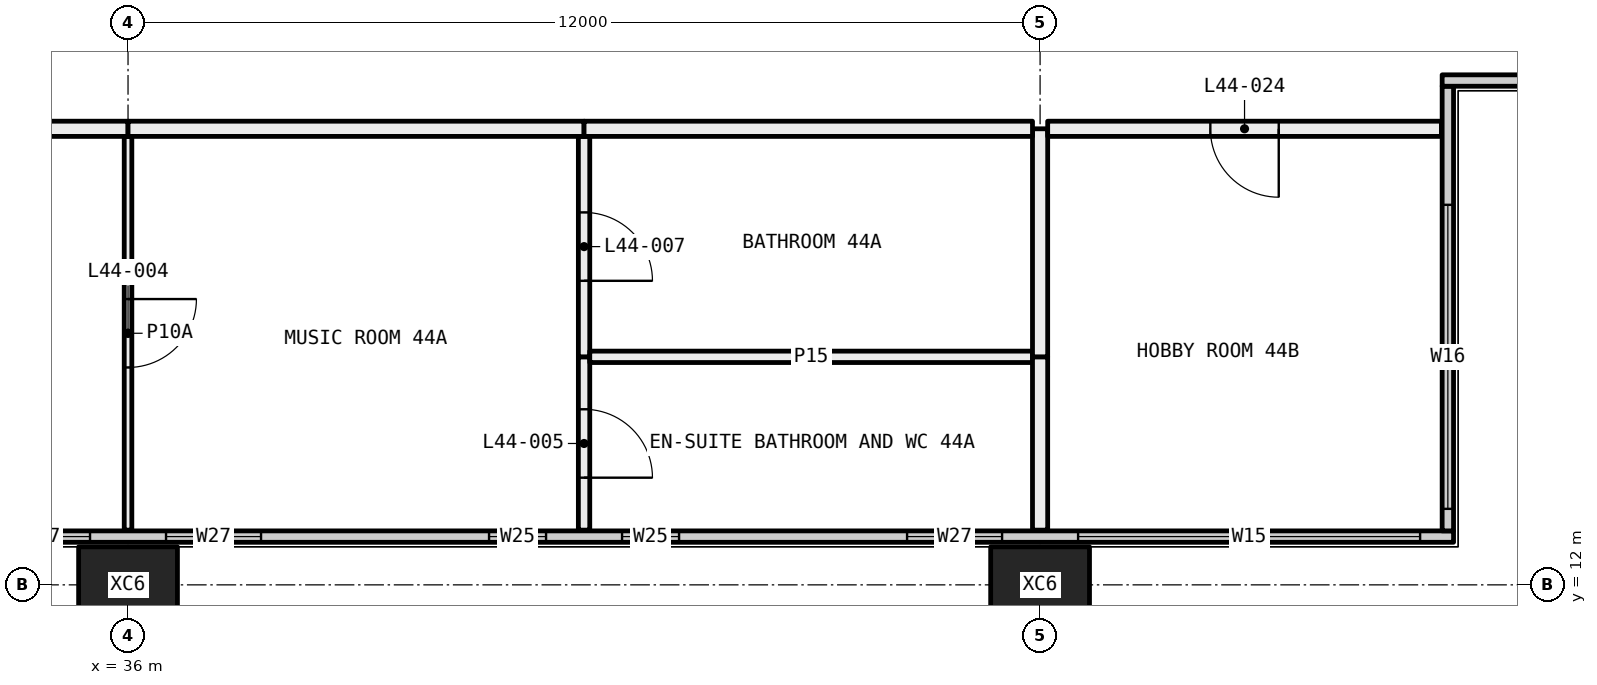
"""IFC4 building model, lengths in metres.
Left out: names, types, materials, properties, quantities, classifications, styles, units other than length and angle.
Written with IfcOpenShell. Run it as: python <this file> out.ifc"""

import sys

from ifc_helpers import new_model, si_unit, direction, frame, frame_2d, origin, origin_2d, place, context, subcontext, project, spatial, rectangle, hollow_rectangle, extrude, element, fill, save


model = new_model("IFC4")
c1 = context("Model", 3, precision=1e-05, world=origin(), true_north=direction((0.0, 1.0)))
c2 = subcontext(c1, "Body", "Model", "MODEL_VIEW")
j1 = project(units=[si_unit("LENGTHUNIT", "METRE"), si_unit("PLANEANGLEUNIT", "RADIAN")], contexts=[c1])
p1 = place(None, origin())
s1 = spatial("IfcSite", under=j1, at=p1, CompositionType="ELEMENT")
p2 = place(p1, origin())
s2 = spatial("IfcBuilding", under=s1, at=p2, CompositionType="ELEMENT")
p3 = place(p2, frame((0.0, 0.0, 168.6)))
s3 = spatial("IfcBuildingStorey", under=s2, at=p3, CompositionType="ELEMENT", Elevation=168.6)
for number, where, z_axis, x_axis in (
    (1, (36.0, 12.0, -0.4), (0.0, 0.0, 1.0), (1.0, 0.0, 0.0)),
    (2, (48.0, 12.0, -0.4), (0.0, 0.0, 1.0), (1.0, 0.0, 0.0)),
):
    element("IfcColumn", number, at=place(p3, frame(where, z_axis=z_axis, x_axis=x_axis)), inside=s3, PredefinedType="COLUMN", context=c2, shape_type="SweptSolid", body=[
        extrude(hollow_rectangle(XDim=1.3, YDim=1.0, WallThickness=0.05, at=origin_2d()), origin(), (0.0, 0.0, 1.0), 3.45),
    ])
p4 = place(p3, frame((6.56, 12.635, 0.0), z_axis=(0.0, 0.0, 1.0), x_axis=(1.0, 0.0, 0.0)))
e3 = element("IfcWall", 3, at=p4, inside=s3, PredefinedType="ELEMENTEDWALL", context=c2, shape_type="SweptSolid", body=[
    extrude(rectangle(XDim=46.88, YDim=0.15, at=frame_2d((23.44, 0.0))), origin(), (0.0, 0.0, 1.0), 3.05),
])
p5 = place(p4, frame((0.44, 0.0, 0.45)))
e4 = element("IfcOpeningElement", 4, at=p5, cuts=e3, PredefinedType="OPENING", context=c2, shape_type="SweptSolid", body=[
    extrude(rectangle(XDim=4.5, YDim=2.55, at=frame_2d((2.25, 1.275))), frame((0.0, 0.085, 0.0), z_axis=(0.0, -1.0, 0.0), x_axis=(1.0, 0.0, 0.0)), (0.0, 0.0, 1.0), 0.17),
])
p6 = place(p4, frame((5.94, 0.0, 0.45)))
e5 = element("IfcOpeningElement", 5, at=p6, cuts=e3, PredefinedType="OPENING", context=c2, shape_type="SweptSolid", body=[
    extrude(rectangle(XDim=1.25, YDim=2.55, at=frame_2d((0.625, 1.275))), frame((0.0, 0.085, 0.0), z_axis=(0.0, -1.0, 0.0), x_axis=(1.0, 0.0, 0.0)), (0.0, 0.0, 1.0), 0.17),
])
p7 = place(p4, frame((10.19, 0.0, 0.45)))
e6 = element("IfcOpeningElement", 6, at=p7, cuts=e3, PredefinedType="OPENING", context=c2, shape_type="SweptSolid", body=[
    extrude(rectangle(XDim=0.75, YDim=2.55, at=frame_2d((0.375, 1.275))), frame((0.0, 0.085, 0.0), z_axis=(0.0, -1.0, 0.0), x_axis=(1.0, 0.0, 0.0)), (0.0, 0.0, 1.0), 0.17),
])
p8 = place(p4, frame((11.94, 0.0, 0.45)))
e7 = element("IfcOpeningElement", 7, at=p8, cuts=e3, PredefinedType="OPENING", context=c2, shape_type="SweptSolid", body=[
    extrude(rectangle(XDim=0.75, YDim=2.55, at=frame_2d((0.375, 1.275))), frame((0.0, 0.085, 0.0), z_axis=(0.0, -1.0, 0.0), x_axis=(1.0, 0.0, 0.0)), (0.0, 0.0, 1.0), 0.17),
])
p9 = place(p4, frame((15.69, 0.0, 0.45)))
e8 = element("IfcOpeningElement", 8, at=p9, cuts=e3, PredefinedType="OPENING", context=c2, shape_type="SweptSolid", body=[
    extrude(rectangle(XDim=1.25, YDim=2.55, at=frame_2d((0.625, 1.275))), frame((0.0, 0.085, 0.0), z_axis=(0.0, -1.0, 0.0), x_axis=(1.0, 0.0, 0.0)), (0.0, 0.0, 1.0), 0.17),
])
p10 = place(p4, frame((17.94, 0.0, 0.45)))
e9 = element("IfcOpeningElement", 9, at=p10, cuts=e3, PredefinedType="OPENING", context=c2, shape_type="SweptSolid", body=[
    extrude(rectangle(XDim=1.25, YDim=2.55, at=frame_2d((0.625, 1.275))), frame((0.0, 0.085, 0.0), z_axis=(0.0, -1.0, 0.0), x_axis=(1.0, 0.0, 0.0)), (0.0, 0.0, 1.0), 0.17),
])
p11 = place(p4, frame((22.19, 0.0, 0.45)))
e10 = element("IfcOpeningElement", 10, at=p11, cuts=e3, PredefinedType="OPENING", context=c2, shape_type="SweptSolid", body=[
    extrude(rectangle(XDim=0.75, YDim=2.55, at=frame_2d((0.375, 1.275))), frame((0.0, 0.085, 0.0), z_axis=(0.0, -1.0, 0.0), x_axis=(1.0, 0.0, 0.0)), (0.0, 0.0, 1.0), 0.17),
])
p12 = place(p4, frame((23.94, 0.0, 0.45)))
e11 = element("IfcOpeningElement", 11, at=p12, cuts=e3, PredefinedType="OPENING", context=c2, shape_type="SweptSolid", body=[
    extrude(rectangle(XDim=0.75, YDim=2.55, at=frame_2d((0.375, 1.275))), frame((0.0, 0.085, 0.0), z_axis=(0.0, -1.0, 0.0), x_axis=(1.0, 0.0, 0.0)), (0.0, 0.0, 1.0), 0.17),
])
p13 = place(p4, frame((27.69, 0.0, 0.45)))
e12 = element("IfcOpeningElement", 12, at=p13, cuts=e3, PredefinedType="OPENING", context=c2, shape_type="SweptSolid", body=[
    extrude(rectangle(XDim=1.25, YDim=2.55, at=frame_2d((0.625, 1.275))), frame((0.0, 0.085, 0.0), z_axis=(0.0, -1.0, 0.0), x_axis=(1.0, 0.0, 0.0)), (0.0, 0.0, 1.0), 0.17),
])
p14 = place(p4, frame((29.94, 0.0, 0.45)))
e13 = element("IfcOpeningElement", 13, at=p14, cuts=e3, PredefinedType="OPENING", context=c2, shape_type="SweptSolid", body=[
    extrude(rectangle(XDim=1.25, YDim=2.55, at=frame_2d((0.625, 1.275))), frame((0.0, 0.085, 0.0), z_axis=(0.0, -1.0, 0.0), x_axis=(1.0, 0.0, 0.0)), (0.0, 0.0, 1.0), 0.17),
])
p15 = place(p4, frame((34.19, 0.0, 0.45)))
e14 = element("IfcOpeningElement", 14, at=p15, cuts=e3, PredefinedType="OPENING", context=c2, shape_type="SweptSolid", body=[
    extrude(rectangle(XDim=0.75, YDim=2.55, at=frame_2d((0.375, 1.275))), frame((0.0, 0.085, 0.0), z_axis=(0.0, -1.0, 0.0), x_axis=(1.0, 0.0, 0.0)), (0.0, 0.0, 1.0), 0.17),
])
p16 = place(p4, frame((35.94, 0.0, 0.45)))
e15 = element("IfcOpeningElement", 15, at=p16, cuts=e3, PredefinedType="OPENING", context=c2, shape_type="SweptSolid", body=[
    extrude(rectangle(XDim=0.75, YDim=2.55, at=frame_2d((0.375, 1.275))), frame((0.0, 0.085, 0.0), z_axis=(0.0, -1.0, 0.0), x_axis=(1.0, 0.0, 0.0)), (0.0, 0.0, 1.0), 0.17),
])
p17 = place(p4, frame((39.69, 0.0, 0.45)))
e16 = element("IfcOpeningElement", 16, at=p17, cuts=e3, PredefinedType="OPENING", context=c2, shape_type="SweptSolid", body=[
    extrude(rectangle(XDim=1.25, YDim=2.55, at=frame_2d((0.625, 1.275))), frame((0.0, 0.085, 0.0), z_axis=(0.0, -1.0, 0.0), x_axis=(1.0, 0.0, 0.0)), (0.0, 0.0, 1.0), 0.17),
])
p18 = place(p4, frame((41.94, 0.0, 0.45)))
e17 = element("IfcOpeningElement", 17, at=p18, cuts=e3, PredefinedType="OPENING", context=c2, shape_type="SweptSolid", body=[
    extrude(rectangle(XDim=4.5, YDim=2.55, at=frame_2d((2.25, 1.275))), frame((0.0, 0.085, 0.0), z_axis=(0.0, -1.0, 0.0), x_axis=(1.0, 0.0, 0.0)), (0.0, 0.0, 1.0), 0.17),
])
p19 = place(p3, frame((53.365, 12.71, 0.0), z_axis=(0.0, 0.0, 1.0), x_axis=(0.0, 1.0, 0.0)))
e18 = element("IfcWall", 18, at=p19, inside=s3, PredefinedType="ELEMENTEDWALL", context=c2, shape_type="SweptSolid", body=[
    extrude(rectangle(XDim=5.85, YDim=0.15, at=frame_2d((2.925, 0.0))), origin(), (0.0, 0.0, 1.0), 3.05),
])
p20 = place(p19, frame((0.29, 0.0, 0.45)))
e19 = element("IfcOpeningElement", 19, at=p20, cuts=e18, PredefinedType="OPENING", context=c2, shape_type="SweptSolid", body=[
    extrude(rectangle(XDim=4.0, YDim=2.55, at=frame_2d((2.0, 1.275))), frame((0.0, 0.085, 0.0), z_axis=(0.0, -1.0, 0.0), x_axis=(1.0, 0.0, 0.0)), (0.0, 0.0, 1.0), 0.17),
])
p21 = place(p3, frame((53.29, 18.635, 0.0), z_axis=(0.0, 0.0, 1.0), x_axis=(1.0, 0.0, 0.0)))
e20 = element("IfcWall", 20, at=p21, inside=s3, PredefinedType="ELEMENTEDWALL", context=c2, shape_type="SweptSolid", body=[
    extrude(rectangle(XDim=6.15, YDim=0.15, at=frame_2d((3.075, 0.0))), origin(), (0.0, 0.0, 1.0), 3.05),
])
p22 = place(p21, frame((1.71, 0.0, 0.45)))
e21 = element("IfcOpeningElement", 21, at=p22, cuts=e20, PredefinedType="OPENING", context=c2, shape_type="SweptSolid", body=[
    extrude(rectangle(XDim=4.0, YDim=2.55, at=frame_2d((2.0, 1.275))), frame((0.0, 0.085, 0.0), z_axis=(0.0, -1.0, 0.0), x_axis=(1.0, 0.0, 0.0)), (0.0, 0.0, 1.0), 0.17),
])
p23 = place(p3, frame((36.0, 12.72, 0.0), z_axis=(0.0, 0.0, 1.0), x_axis=(0.0, 1.0, 0.0)))
e22 = element("IfcWall", 22, at=p23, inside=s3, PredefinedType="PARTITIONING", context=c2, shape_type="SweptSolid", body=[
    extrude(rectangle(XDim=5.18, YDim=0.1, at=frame_2d((2.59, 0.0))), origin(), (0.0, 0.0, 1.0), 2.45),
])
p24 = place(p23, frame((2.14, 0.0, 0.0)))
e23 = element("IfcOpeningElement", 23, at=p24, cuts=e22, PredefinedType="OPENING", context=c2, shape_type="SweptSolid", body=[
    extrude(rectangle(XDim=0.9, YDim=2.1, at=frame_2d((0.45, 1.05))), frame((0.0, 0.06, 0.0), z_axis=(0.0, -1.0, 0.0), x_axis=(1.0, 0.0, 0.0)), (0.0, 0.0, 1.0), 0.12),
])
p25 = place(p3, frame((36.0, 18.0, 0.0), z_axis=(0.0, 0.0, 1.0), x_axis=(-1.0, 0.0, 0.0)))
e24 = element("IfcWall", 24, at=p25, inside=s3, PredefinedType="PARTITIONING", context=c2, shape_type="SweptSolid", body=[
    extrude(rectangle(XDim=12.0, YDim=0.2, at=frame_2d((6.0, 0.0))), origin(), (0.0, 0.0, 1.0), 2.45),
])
p26 = place(p3, frame((42.0, 12.72, 0.0), z_axis=(0.0, 0.0, 1.0), x_axis=(0.0, 1.0, 0.0)))
e25 = element("IfcWall", 25, at=p26, inside=s3, PredefinedType="PARTITIONING", context=c2, shape_type="SweptSolid", body=[
    extrude(rectangle(XDim=2.28, YDim=0.15, at=frame_2d((1.14, 0.0))), origin(), (0.0, 0.0, 1.0), 3.05),
])
p27 = place(p26, frame((0.69, 0.0, 0.0)))
e26 = element("IfcOpeningElement", 26, at=p27, cuts=e25, PredefinedType="OPENING", context=c2, shape_type="SweptSolid", body=[
    extrude(rectangle(XDim=0.9, YDim=2.1, at=frame_2d((0.45, 1.05))), frame((0.0, 0.085, 0.0), z_axis=(0.0, -1.0, 0.0), x_axis=(1.0, 0.0, 0.0)), (0.0, 0.0, 1.0), 0.17),
])
p28 = place(p3, frame((42.0, 15.0, 0.0), z_axis=(0.0, 0.0, 1.0), x_axis=(0.0, 1.0, 0.0)))
e27 = element("IfcWall", 27, at=p28, inside=s3, PredefinedType="PARTITIONING", context=c2, shape_type="SweptSolid", body=[
    extrude(rectangle(XDim=2.9, YDim=0.15, at=frame_2d((1.45, 0.0))), origin(), (0.0, 0.0, 1.0), 3.05),
])
p29 = place(p28, frame((1.0, 0.0, 0.0)))
e28 = element("IfcOpeningElement", 28, at=p29, cuts=e27, PredefinedType="OPENING", context=c2, shape_type="SweptSolid", body=[
    extrude(rectangle(XDim=0.9, YDim=2.1, at=frame_2d((0.45, 1.05))), frame((0.0, 0.085, 0.0), z_axis=(0.0, -1.0, 0.0), x_axis=(1.0, 0.0, 0.0)), (0.0, 0.0, 1.0), 0.17),
])
p30 = place(p3, frame((42.0, 18.0, 0.0), z_axis=(0.0, 0.0, 1.0), x_axis=(-1.0, 0.0, 0.0)))
e29 = element("IfcWall", 29, at=p30, inside=s3, PredefinedType="PARTITIONING", context=c2, shape_type="SweptSolid", body=[
    extrude(rectangle(XDim=6.0, YDim=0.2, at=frame_2d((3.0, 0.0))), origin(), (0.0, 0.0, 1.0), 2.45),
])
p31 = place(p3, frame((47.9, 15.0, 0.0), z_axis=(0.0, 0.0, 1.0), x_axis=(-1.0, 0.0, 0.0)))
e30 = element("IfcWall", 30, at=p31, inside=s3, PredefinedType="PARTITIONING", context=c2, shape_type="SweptSolid", body=[
    extrude(rectangle(XDim=5.825, YDim=0.15, at=frame_2d((2.913, 0.0))), origin(), (0.0, 0.0, 1.0), 3.05),
])
p32 = place(p3, frame((48.0, 12.72, 0.0), z_axis=(0.0, 0.0, 1.0), x_axis=(0.0, 1.0, 0.0)))
e31 = element("IfcWall", 31, at=p32, inside=s3, PredefinedType="PARTITIONING", context=c2, shape_type="SweptSolid", body=[
    extrude(rectangle(XDim=2.28, YDim=0.2, at=frame_2d((1.14, 0.0))), origin(), (0.0, 0.0, 1.0), 3.05),
])
p33 = place(p3, frame((48.0, 15.0, 0.0), z_axis=(0.0, 0.0, 1.0), x_axis=(0.0, 1.0, 0.0)))
e32 = element("IfcWall", 32, at=p33, inside=s3, PredefinedType="PARTITIONING", context=c2, shape_type="SweptSolid", body=[
    extrude(rectangle(XDim=3.0, YDim=0.2, at=frame_2d((1.5, 0.0))), origin(), (0.0, 0.0, 1.0), 3.05),
])
p34 = place(p3, frame((47.9, 18.0, 0.0), z_axis=(0.0, 0.0, 1.0), x_axis=(-1.0, 0.0, 0.0)))
e33 = element("IfcWall", 33, at=p34, inside=s3, PredefinedType="PARTITIONING", context=c2, shape_type="SweptSolid", body=[
    extrude(rectangle(XDim=5.9, YDim=0.2, at=frame_2d((2.95, 0.0))), origin(), (0.0, 0.0, 1.0), 3.05),
])
p35 = place(p3, frame((53.28, 18.0, 0.0), z_axis=(0.0, 0.0, 1.0), x_axis=(-1.0, 0.0, 0.0)))
e34 = element("IfcWall", 34, at=p35, inside=s3, PredefinedType="PARTITIONING", context=c2, shape_type="SweptSolid", body=[
    extrude(rectangle(XDim=5.18, YDim=0.2, at=frame_2d((2.59, 0.0))), origin(), (0.0, 0.0, 1.0), 3.05),
])
p36 = place(p35, frame((2.14, 0.0, 0.0)))
e35 = element("IfcOpeningElement", 35, at=p36, cuts=e34, PredefinedType="OPENING", context=c2, shape_type="SweptSolid", body=[
    extrude(rectangle(XDim=0.9, YDim=2.1, at=frame_2d((0.45, 1.05))), frame((0.0, 0.11, 0.0), z_axis=(0.0, -1.0, 0.0), x_axis=(1.0, 0.0, 0.0)), (0.0, 0.0, 1.0), 0.22),
])
p37 = place(p13, origin())
e36 = element("IfcWindow", 36, at=p37, inside=s3, PartitioningType="SINGLE_PANEL", PredefinedType="WINDOW", context=c2, shape_type="SweptSolid", body=[
    extrude(rectangle(XDim=1.25, YDim=2.55, at=frame_2d((0.625, 1.275))), frame((0.0, 0.03, 0.0), z_axis=(0.0, -1.0, 0.0), x_axis=(1.0, 0.0, 0.0)), (0.0, 0.0, 1.0), 0.06),
])
fill(e12, e36)
p38 = place(p14, origin())
e37 = element("IfcWindow", 37, at=p38, inside=s3, PartitioningType="SINGLE_PANEL", PredefinedType="WINDOW", context=c2, shape_type="SweptSolid", body=[
    extrude(rectangle(XDim=1.25, YDim=2.55, at=frame_2d((0.625, 1.275))), frame((0.0, 0.03, 0.0), z_axis=(0.0, -1.0, 0.0), x_axis=(1.0, 0.0, 0.0)), (0.0, 0.0, 1.0), 0.06),
])
fill(e13, e37)
p39 = place(p15, origin())
e38 = element("IfcWindow", 38, at=p39, inside=s3, PartitioningType="SINGLE_PANEL", PredefinedType="WINDOW", context=c2, shape_type="SweptSolid", body=[
    extrude(rectangle(XDim=0.75, YDim=2.55, at=frame_2d((0.375, 1.275))), frame((0.0, 0.03, 0.0), z_axis=(0.0, -1.0, 0.0), x_axis=(1.0, 0.0, 0.0)), (0.0, 0.0, 1.0), 0.06),
])
fill(e14, e38)
p40 = place(p16, origin())
e39 = element("IfcWindow", 39, at=p40, inside=s3, PartitioningType="SINGLE_PANEL", PredefinedType="WINDOW", context=c2, shape_type="SweptSolid", body=[
    extrude(rectangle(XDim=0.75, YDim=2.55, at=frame_2d((0.375, 1.275))), frame((0.0, 0.03, 0.0), z_axis=(0.0, -1.0, 0.0), x_axis=(1.0, 0.0, 0.0)), (0.0, 0.0, 1.0), 0.06),
])
fill(e15, e39)
p41 = place(p17, origin())
e40 = element("IfcWindow", 40, at=p41, inside=s3, PartitioningType="SINGLE_PANEL", PredefinedType="WINDOW", context=c2, shape_type="SweptSolid", body=[
    extrude(rectangle(XDim=1.25, YDim=2.55, at=frame_2d((0.625, 1.275))), frame((0.0, 0.03, 0.0), z_axis=(0.0, -1.0, 0.0), x_axis=(1.0, 0.0, 0.0)), (0.0, 0.0, 1.0), 0.06),
])
fill(e16, e40)
p42 = place(p18, origin())
e41 = element("IfcWindow", 41, at=p42, inside=s3, PartitioningType="SINGLE_PANEL", PredefinedType="WINDOW", context=c2, shape_type="SweptSolid", body=[
    extrude(rectangle(XDim=4.5, YDim=2.55, at=frame_2d((2.25, 1.275))), frame((0.0, 0.03, 0.0), z_axis=(0.0, -1.0, 0.0), x_axis=(1.0, 0.0, 0.0)), (0.0, 0.0, 1.0), 0.06),
])
fill(e17, e41)
p43 = place(p20, origin())
e42 = element("IfcWindow", 42, at=p43, inside=s3, PartitioningType="SINGLE_PANEL", PredefinedType="WINDOW", context=c2, shape_type="SweptSolid", body=[
    extrude(rectangle(XDim=4.0, YDim=2.55, at=frame_2d((2.0, 1.275))), frame((0.0, 0.03, 0.0), z_axis=(0.0, -1.0, 0.0), x_axis=(1.0, 0.0, 0.0)), (0.0, 0.0, 1.0), 0.06),
])
fill(e19, e42)
p44 = place(p24, frame((0.9, 0.0, 0.0), x_axis=(-1.0, 0.0, 0.0)))
e43 = element("IfcDoor", 43, at=p44, inside=s3, OperationType="SINGLE_SWING_RIGHT", PredefinedType="DOOR", context=c2, shape_type="SweptSolid", body=[
    extrude(rectangle(XDim=0.9, YDim=2.1, at=frame_2d((0.45, 1.05))), frame((0.0, 0.025, 0.0), z_axis=(0.0, -1.0, 0.0), x_axis=(1.0, 0.0, 0.0)), (0.0, 0.0, 1.0), 0.05),
])
fill(e23, e43)
p45 = place(p27, frame((0.9, 0.0, 0.0), x_axis=(-1.0, 0.0, 0.0)))
e44 = element("IfcDoor", 44, at=p45, inside=s3, OperationType="SINGLE_SWING_LEFT", PredefinedType="DOOR", context=c2, shape_type="SweptSolid", body=[
    extrude(rectangle(XDim=0.9, YDim=2.1, at=frame_2d((0.45, 1.05))), frame((0.0, 0.025, 0.0), z_axis=(0.0, -1.0, 0.0), x_axis=(1.0, 0.0, 0.0)), (0.0, 0.0, 1.0), 0.05),
])
fill(e26, e44)
p46 = place(p29, frame((0.9, 0.0, 0.0), x_axis=(-1.0, 0.0, 0.0)))
e45 = element("IfcDoor", 45, at=p46, inside=s3, OperationType="SINGLE_SWING_LEFT", PredefinedType="DOOR", context=c2, shape_type="SweptSolid", body=[
    extrude(rectangle(XDim=0.9, YDim=2.1, at=frame_2d((0.45, 1.05))), frame((0.0, 0.025, 0.0), z_axis=(0.0, -1.0, 0.0), x_axis=(1.0, 0.0, 0.0)), (0.0, 0.0, 1.0), 0.05),
])
fill(e28, e45)
p47 = place(p36, origin())
e46 = element("IfcDoor", 46, at=p47, inside=s3, OperationType="SINGLE_SWING_RIGHT", PredefinedType="DOOR", context=c2, shape_type="SweptSolid", body=[
    extrude(rectangle(XDim=0.9, YDim=2.1, at=frame_2d((0.45, 1.05))), frame((0.0, 0.025, 0.0), z_axis=(0.0, -1.0, 0.0), x_axis=(1.0, 0.0, 0.0)), (0.0, 0.0, 1.0), 0.05),
])
fill(e35, e46)
save(model, sys.argv[1])
